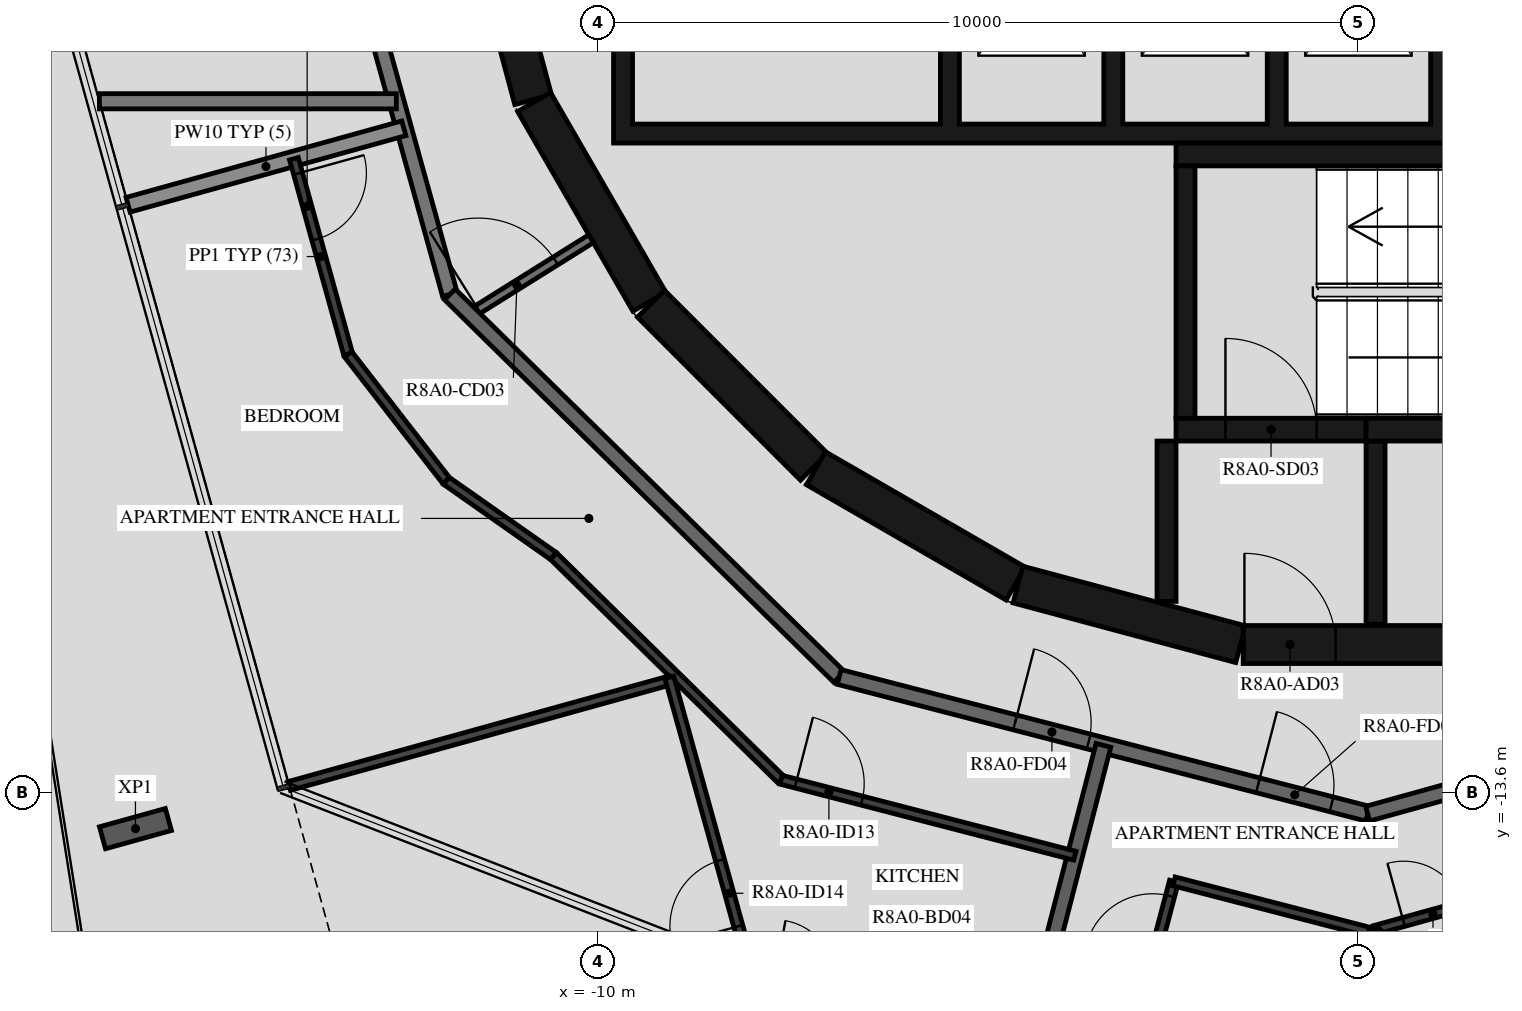
"""IFC4 building model, lengths in metres.
Left out: names, types, materials, properties, quantities, classifications, styles, units other than length and angle.
Written with IfcOpenShell. Run it as: python <this file> out.ifc"""

import sys

from ifc_helpers import new_model, si_unit, direction, frame, frame_2d, origin, origin_2d, place, context, subcontext, project, spatial, polyline, rectangle, i_section, outline, extrude, element, fill, save


model = new_model("IFC4")
c1 = context("Model", 3, precision=1e-05, world=origin(), true_north=direction((0.0, 1.0)))
c2 = subcontext(c1, "Body", "Model", "MODEL_VIEW")
j1 = project(units=[si_unit("LENGTHUNIT", "METRE"), si_unit("PLANEANGLEUNIT", "RADIAN")], contexts=[c1])
p1 = place(None, origin())
s1 = spatial("IfcSite", under=j1, at=p1, CompositionType="ELEMENT")
p2 = place(p1, origin())
s2 = spatial("IfcBuilding", under=s1, at=p2, CompositionType="ELEMENT")
p3 = place(p2, frame((0.0, 0.0, 298.2)))
s3 = spatial("IfcBuildingStorey", under=s2, at=p3, CompositionType="ELEMENT", Elevation=298.2)
p4 = place(p3, frame((-16.09, -14.069, -0.45), z_axis=(0.0, 0.0, 1.0), x_axis=(-0.267238143562, 0.963630517691, 0.0)))
e1 = element("IfcColumn", 1, at=p4, inside=s3, PredefinedType="COLUMN", context=c2, shape_type="SweptSolid", body=[
    extrude(i_section(OverallWidth=0.3, OverallDepth=0.9, WebThickness=0.019, FlangeThickness=0.035, FilletRadius=0.03, at=origin_2d()), origin(), (0.0, 0.0, 1.0), 3.57),
])
p5 = place(p3, frame((-11.643, -1.55, 0.0), z_axis=(0.0, 0.0, 1.0), x_axis=(0.258734743916, -0.965948410781, 0.0)))
e2 = element("IfcWall", 2, at=p5, inside=s3, PredefinedType="SHEAR", context=c2, shape_type="SweptSolid", body=[
    extrude(rectangle(XDim=3.033, YDim=0.5, at=frame_2d((1.516, 0.0))), origin(), (0.0, 0.0, 1.0), 3.12),
])
p6 = place(p5, frame((1.066, 0.0, 0.0)))
e3 = element("IfcOpeningElement", 3, at=p6, cuts=e2, PredefinedType="OPENING", context=c2, shape_type="SweptSolid", body=[
    extrude(rectangle(XDim=0.9, YDim=2.1, at=frame_2d((0.45, 1.05))), frame((0.0, 0.26, 0.0), z_axis=(0.0, -1.0, 0.0), x_axis=(1.0, 0.0, 0.0)), (0.0, 0.0, 1.0), 0.52),
])
p7 = place(p3, frame((-10.845, -4.51, 0.0), z_axis=(0.0, 0.0, 1.0), x_axis=(0.500087131594, -0.865975092491, 0.0)))
e4 = element("IfcWall", 4, at=p7, inside=s3, PredefinedType="SHEAR", context=c2, shape_type="SweptSolid", body=[
    extrude(rectangle(XDim=3.033, YDim=0.5, at=frame_2d((1.516, 0.0))), origin(), (0.0, 0.0, 1.0), 3.12),
])
p8 = place(p3, frame((-9.308, -7.164, 0.0), z_axis=(0.0, 0.0, 1.0), x_axis=(0.707106781187, -0.707106781187, 0.0)))
e5 = element("IfcWall", 5, at=p8, inside=s3, PredefinedType="SHEAR", context=c2, shape_type="SweptSolid", body=[
    extrude(rectangle(XDim=3.032, YDim=0.5, at=frame_2d((1.516, 0.0))), origin(), (0.0, 0.0, 1.0), 3.12),
])
for number, where, z_axis, x_axis in (
    (6, (-7.137, -9.329, 0.0), (0.0, 0.0, 1.0), (0.866, -0.5, 0.0)),
    (7, (-4.479, -10.858, 0.0), (0.0, 0.0, 1.0), (0.966, -0.259, 0.0)),
):
    element("IfcWall", number, at=place(p3, frame(where, z_axis=z_axis, x_axis=x_axis)), inside=s3, PredefinedType="SHEAR", context=c2, shape_type="SweptSolid", body=[
        extrude(rectangle(XDim=3.033, YDim=0.5, at=frame_2d((1.516, 0.0))), origin(), (0.0, 0.0, 1.0), 3.12),
    ])
p9 = place(p3, frame((-1.516, -11.647, 0.0), z_axis=(0.0, 0.0, 1.0), x_axis=(1.0, 0.0, 0.0)))
e8 = element("IfcWall", 8, at=p9, inside=s3, PredefinedType="SHEAR", context=c2, shape_type="SweptSolid", body=[
    extrude(rectangle(XDim=3.033, YDim=0.5, at=frame_2d((1.516, 0.0))), origin(), (0.0, 0.0, 1.0), 3.12),
])
p10 = place(p9, frame((0.016, 0.0, 0.0)))
e9 = element("IfcOpeningElement", 9, at=p10, cuts=e8, PredefinedType="OPENING", context=c2, shape_type="SweptSolid", body=[
    extrude(rectangle(XDim=1.2, YDim=2.1, at=frame_2d((0.6, 1.05))), frame((0.0, 0.26, 0.0), z_axis=(0.0, -1.0, 0.0), x_axis=(1.0, 0.0, 0.0)), (0.0, 0.0, 1.0), 0.52),
])
p11 = place(p3, frame((-2.275, -8.67, 0.0), z_axis=(0.0, 0.0, 1.0), x_axis=(0.0, 1.0, 0.0)))
e10 = element("IfcWall", 10, at=p11, inside=s3, PredefinedType="SHEAR", context=c2, shape_type="SweptSolid", body=[
    extrude(rectangle(XDim=3.32, YDim=0.25, at=frame_2d((1.66, 0.0))), origin(), (0.0, 0.0, 1.0), 3.12),
])
p12 = place(p3, frame((-2.4, -5.2, 0.0), z_axis=(0.0, 0.0, 1.0), x_axis=(1.0, 0.0, 0.0)))
e11 = element("IfcWall", 11, at=p12, inside=s3, PredefinedType="SHEAR", context=c2, shape_type="SweptSolid", body=[
    extrude(rectangle(XDim=7.05, YDim=0.3, at=frame_2d((3.525, 0.0))), origin(), (0.0, 0.0, 1.0), 3.12),
])
p13 = place(p3, frame((0.1, -8.82, 0.0), z_axis=(0.0, 0.0, 1.0), x_axis=(1.0, 0.0, 0.0)))
e12 = element("IfcWall", 12, at=p13, inside=s3, PredefinedType="SHEAR", context=c2, shape_type="SweptSolid", body=[
    extrude(rectangle(XDim=4.55, YDim=0.3, at=frame_2d((2.275, 0.0))), origin(), (0.0, 0.0, 1.0), 3.12),
])
p14 = place(p3, frame((-2.4, -8.82, 0.0), z_axis=(0.0, 0.0, 1.0), x_axis=(1.0, 0.0, 0.0)))
e13 = element("IfcWall", 13, at=p14, inside=s3, PredefinedType="SHEAR", context=c2, shape_type="SweptSolid", body=[
    extrude(rectangle(XDim=2.5, YDim=0.3, at=frame_2d((1.25, 0.0))), origin(), (0.0, 0.0, 1.0), 3.12),
])
p15 = place(p14, frame((0.65, 0.0, 0.0)))
e14 = element("IfcOpeningElement", 14, at=p15, cuts=e13, PredefinedType="OPENING", context=c2, shape_type="SweptSolid", body=[
    extrude(rectangle(XDim=1.2, YDim=2.1, at=frame_2d((0.6, 1.05))), frame((0.0, 0.16, 0.0), z_axis=(0.0, -1.0, 0.0), x_axis=(1.0, 0.0, 0.0)), (0.0, 0.0, 1.0), 0.32),
])
p16 = place(p3, frame((-2.525, -8.97, 0.0), z_axis=(0.0, 0.0, 1.0), x_axis=(0.0, -1.0, 0.0)))
e15 = element("IfcWall", 15, at=p16, inside=s3, PredefinedType="SHEAR", context=c2, shape_type="SweptSolid", body=[
    extrude(rectangle(XDim=2.11, YDim=0.25, at=frame_2d((1.055, 0.0))), origin(), (0.0, 0.0, 1.0), 3.12),
])
p17 = place(p3, frame((0.225, -8.97, 0.0), z_axis=(0.0, 0.0, 1.0), x_axis=(0.0, -1.0, 0.0)))
e16 = element("IfcWall", 16, at=p17, inside=s3, PredefinedType="SHEAR", context=c2, shape_type="SweptSolid", body=[
    extrude(rectangle(XDim=2.41, YDim=0.25, at=frame_2d((1.205, 0.0))), origin(), (0.0, 0.0, 1.0), 3.12),
])
p18 = place(p3, origin())
e17 = element("IfcWall", 17, at=p18, inside=s3, PredefinedType="SHEAR", context=c2, shape_type="SweptSolid", body=[
    extrude(outline(polyline([(9.8, -5.05), (9.8, -4.8), (9.8, -1.9), (9.55, -1.9), (9.55, -4.8), (7.65, -4.8), (7.65, -1.9), (7.4, -1.9), (7.4, -4.8), (5.5, -4.8), (5.5, -1.9), (5.25, -1.9), (5.25, -4.8), (3.35, -4.8), (3.35, -1.9), (3.1, -1.9), (3.1, -4.8), (1.2, -4.8), (1.2, -1.9), (0.95, -1.9), (0.95, -4.8), (-0.95, -4.8), (-0.95, -1.9), (-1.2, -1.9), (-1.2, -4.8), (-3.1, -4.8), (-3.1, -1.9), (-3.35, -1.9), (-3.35, -4.8), (-5.25, -4.8), (-5.25, -1.9), (-5.5, -1.9), (-5.5, -4.8), (-9.55, -4.8), (-9.55, -1.9), (-9.8, -1.9), (-9.8, -4.8), (-9.8, -5.05), (9.8, -5.05)])), origin(), (0.0, 0.0, 1.0), 3.12),
])
p19 = place(p3, frame((-11.687, -7.303, 0.0), z_axis=(0.0, 0.0, 1.0), x_axis=(0.848064094072, 0.529893661357, 0.0)))
e18 = element("IfcWall", 18, at=p19, inside=s3, PredefinedType="PARTITIONING", context=c2, shape_type="SweptSolid", body=[
    extrude(rectangle(XDim=1.876, YDim=0.12, at=frame_2d((0.938, 0.0))), origin(), (0.0, 0.0, 1.0), 3.12),
])
p20 = place(p19, frame((0.125, 0.0, 0.0)))
e19 = element("IfcOpeningElement", 19, at=p20, cuts=e18, PredefinedType="OPENING", context=c2, shape_type="SweptSolid", body=[
    extrude(rectangle(XDim=1.2, YDim=2.1, at=frame_2d((0.6, 1.05))), frame((0.0, 0.07, 0.0), z_axis=(0.0, -1.0, 0.0), x_axis=(1.0, 0.0, 0.0)), (0.0, 0.0, 1.0), 0.14),
])
p21 = place(p3, frame((-13.872, -0.121, 0.0), z_axis=(0.0, 0.0, 1.0), x_axis=(0.267254575108, -0.963625960674, 0.0)))
e20 = element("IfcWall", 20, at=p21, inside=s3, PredefinedType="STANDARD", context=c2, shape_type="SweptSolid", body=[
    extrude(rectangle(XDim=7.181, YDim=0.2, at=frame_2d((3.591, 0.0))), origin(), (0.0, 0.0, 1.0), 3.12),
])
p22 = place(p3, frame((-11.953, -7.041, 0.0), z_axis=(0.0, 0.0, 1.0), x_axis=(0.713250549143, -0.70090916255, 0.0)))
e21 = element("IfcWall", 21, at=p22, inside=s3, PredefinedType="STANDARD", context=c2, shape_type="SweptSolid", body=[
    extrude(rectangle(XDim=7.181, YDim=0.2, at=frame_2d((3.59, 0.0))), origin(), (0.0, 0.0, 1.0), 3.12),
])
p23 = place(p3, frame((-6.831, -12.074, 0.0), z_axis=(0.0, 0.0, 1.0), x_axis=(0.968144780225, -0.250391063186, 0.0)))
e22 = element("IfcWall", 22, at=p23, inside=s3, PredefinedType="STANDARD", context=c2, shape_type="SweptSolid", body=[
    extrude(rectangle(XDim=7.181, YDim=0.2, at=frame_2d((3.591, 0.0))), origin(), (0.0, 0.0, 1.0), 3.12),
])
p24 = place(p23, frame((2.39, 0.0, 0.0)))
e23 = element("IfcOpeningElement", 23, at=p24, cuts=e22, PredefinedType="OPENING", context=c2, shape_type="SweptSolid", body=[
    extrude(rectangle(XDim=1.0, YDim=2.1, at=frame_2d((0.5, 1.05))), frame((0.0, 0.11, 0.0), z_axis=(0.0, -1.0, 0.0), x_axis=(1.0, 0.0, 0.0)), (0.0, 0.0, 1.0), 0.22),
])
p25 = place(p23, frame((5.69, 0.0, 0.0)))
e24 = element("IfcOpeningElement", 24, at=p25, cuts=e22, PredefinedType="OPENING", context=c2, shape_type="SweptSolid", body=[
    extrude(rectangle(XDim=1.0, YDim=2.1, at=frame_2d((0.5, 1.05))), frame((0.0, 0.11, 0.0), z_axis=(0.0, -1.0, 0.0), x_axis=(1.0, 0.0, 0.0)), (0.0, 0.0, 1.0), 0.22),
])
p26 = place(p3, frame((0.121, -13.872, 0.0), z_axis=(0.0, 0.0, 1.0), x_axis=(0.963625960674, 0.267254575108, 0.0)))
e25 = element("IfcWall", 25, at=p26, inside=s3, PredefinedType="STANDARD", context=c2, shape_type="SweptSolid", body=[
    extrude(rectangle(XDim=7.181, YDim=0.2, at=frame_2d((3.591, 0.0))), origin(), (0.0, 0.0, 1.0), 3.12),
])
p27 = place(p3, frame((-16.564, -4.5, 0.0), z_axis=(0.0, 0.0, 1.0), x_axis=(1.0, 0.0, 0.0)))
e26 = element("IfcWall", 26, at=p27, inside=s3, PredefinedType="STANDARD", context=c2, shape_type="SweptSolid", body=[
    extrude(rectangle(XDim=3.907, YDim=0.2, at=frame_2d((1.953, 0.0))), origin(), (0.0, 0.0, 1.0), 3.12),
])
p28 = place(p3, frame((-16.187, -5.862, 0.0), z_axis=(0.0, 0.0, 1.0), x_axis=(0.963631166683, 0.267235803358, 0.0)))
e27 = element("IfcWall", 27, at=p28, inside=s3, PredefinedType="STANDARD", context=c2, shape_type="SweptSolid", body=[
    extrude(rectangle(XDim=3.765, YDim=0.2, at=frame_2d((1.882, 0.0))), origin(), (0.0, 0.0, 1.0), 2.73),
])
p29 = place(p3, frame((-4.214, -16.295, 0.0), z_axis=(0.0, 0.0, 1.0), x_axis=(0.250428810918, 0.968135016752, 0.0)))
e28 = element("IfcWall", 28, at=p29, inside=s3, PredefinedType="STANDARD", context=c2, shape_type="SweptSolid", body=[
    extrude(rectangle(XDim=3.432, YDim=0.2, at=frame_2d((1.716, 0.0))), origin(), (0.0, 0.0, 1.0), 3.12),
])
p30 = place(p3, frame((-14.005, -5.256, 0.0), z_axis=(0.0, 0.0, 1.0), x_axis=(0.267200500487, -0.963640956238, 0.0)))
e29 = element("IfcWall", 29, at=p30, inside=s3, PredefinedType="PARTITIONING", context=c2, shape_type="SweptSolid", body=[
    extrude(rectangle(XDim=2.67, YDim=0.12, at=frame_2d((1.335, 0.0))), origin(), (0.0, 0.0, 1.0), 3.12),
])
p31 = place(p30, frame((0.2, 0.0, 0.0)))
e30 = element("IfcOpeningElement", 30, at=p31, cuts=e29, PredefinedType="OPENING", context=c2, shape_type="SweptSolid", body=[
    extrude(rectangle(XDim=0.9, YDim=2.1, at=frame_2d((0.45, 1.05))), frame((0.0, 0.07, 0.0), z_axis=(0.0, -1.0, 0.0), x_axis=(1.0, 0.0, 0.0)), (0.0, 0.0, 1.0), 0.14),
])
p32 = place(p3, frame((-13.291, -7.829, 0.0), z_axis=(0.0, 0.0, 1.0), x_axis=(0.613017069232, -0.790069663277, 0.0)))
e31 = element("IfcWall", 31, at=p32, inside=s3, PredefinedType="PARTITIONING", context=c2, shape_type="SweptSolid", body=[
    extrude(rectangle(XDim=2.106, YDim=0.12, at=frame_2d((1.053, 0.0))), origin(), (0.0, 0.0, 1.0), 3.12),
])
p33 = place(p3, frame((-12.0, -9.493, 0.0), z_axis=(0.0, 0.0, 1.0), x_axis=(0.818312362022, -0.57477376259, 0.0)))
e32 = element("IfcWall", 32, at=p33, inside=s3, PredefinedType="PARTITIONING", context=c2, shape_type="SweptSolid", body=[
    extrude(rectangle(XDim=1.723, YDim=0.12, at=frame_2d((0.862, 0.0))), origin(), (0.0, 0.0, 1.0), 3.12),
])
p34 = place(p3, frame((-10.59, -10.483, 0.0), z_axis=(0.0, 0.0, 1.0), x_axis=(0.713244109461, -0.70091571556, 0.0)))
e33 = element("IfcWall", 33, at=p34, inside=s3, PredefinedType="PARTITIONING", context=c2, shape_type="SweptSolid", body=[
    extrude(rectangle(XDim=4.198, YDim=0.12, at=frame_2d((2.099, 0.0))), origin(), (0.0, 0.0, 1.0), 3.12),
])
p35 = place(p3, frame((-7.596, -13.426, 0.0), z_axis=(0.0, 0.0, 1.0), x_axis=(0.96815406745, -0.250355151095, 0.0)))
e34 = element("IfcWall", 34, at=p35, inside=s3, PredefinedType="PARTITIONING", context=c2, shape_type="SweptSolid", body=[
    extrude(rectangle(XDim=3.992, YDim=0.12, at=frame_2d((1.996, 0.0))), origin(), (0.0, 0.0, 1.0), 3.12),
])
p36 = place(p35, frame((0.2, 0.0, 0.0)))
e35 = element("IfcOpeningElement", 35, at=p36, cuts=e34, PredefinedType="OPENING", context=c2, shape_type="SweptSolid", body=[
    extrude(rectangle(XDim=0.9, YDim=2.1, at=frame_2d((0.45, 1.05))), frame((0.0, 0.07, 0.0), z_axis=(0.0, -1.0, 0.0), x_axis=(1.0, 0.0, 0.0)), (0.0, 0.0, 1.0), 0.14),
])
p37 = place(p3, frame((-14.066, -13.508, 0.0), z_axis=(0.0, 0.0, 1.0), x_axis=(0.963643585504, 0.267191018032, 0.0)))
e36 = element("IfcWall", 36, at=p37, inside=s3, PredefinedType="PARTITIONING", context=c2, shape_type="SweptSolid", body=[
    extrude(rectangle(XDim=5.2, YDim=0.12, at=frame_2d((2.6, 0.0))), origin(), (0.0, 0.0, 1.0), 2.73),
])
p38 = place(p3, frame((-7.368, -18.202, 0.0), z_axis=(0.0, 0.0, 1.0), x_axis=(-0.26723158658, 0.963632336077, 0.0)))
e37 = element("IfcWall", 37, at=p38, inside=s3, PredefinedType="PARTITIONING", context=c2, shape_type="SweptSolid", body=[
    extrude(rectangle(XDim=6.353, YDim=0.12, at=frame_2d((3.177, 0.0))), origin(), (0.0, 0.0, 1.0), 3.12),
])
p39 = place(p38, frame((2.956, 0.0, 0.0)))
e38 = element("IfcOpeningElement", 38, at=p39, cuts=e37, PredefinedType="OPENING", context=c2, shape_type="SweptSolid", body=[
    extrude(rectangle(XDim=0.9, YDim=2.1, at=frame_2d((0.45, 1.05))), frame((0.0, 0.07, 0.0), z_axis=(0.0, -1.0, 0.0), x_axis=(1.0, 0.0, 0.0)), (0.0, 0.0, 1.0), 0.14),
])
p40 = place(p3, frame((-3.139, -17.448, 0.0), z_axis=(0.0, 0.0, 1.0), x_axis=(0.256551998295, 0.966530430028, 0.0)))
e39 = element("IfcWall", 39, at=p40, inside=s3, PredefinedType="PARTITIONING", context=c2, shape_type="SweptSolid", body=[
    extrude(rectangle(XDim=2.778, YDim=0.12, at=frame_2d((1.389, 0.0))), origin(), (0.0, 0.0, 1.0), 3.12),
])
p41 = place(p40, frame((1.678, 0.0, 0.0)))
e40 = element("IfcOpeningElement", 40, at=p41, cuts=e39, PredefinedType="OPENING", context=c2, shape_type="SweptSolid", body=[
    extrude(rectangle(XDim=0.9, YDim=2.1, at=frame_2d((0.45, 1.05))), frame((0.0, 0.07, 0.0), z_axis=(0.0, -1.0, 0.0), x_axis=(1.0, 0.0, 0.0)), (0.0, 0.0, 1.0), 0.14),
])
p42 = place(p3, frame((-2.427, -14.763, 0.0), z_axis=(0.0, 0.0, 1.0), x_axis=(0.968151154118, -0.250366417036, 0.0)))
e41 = element("IfcWall", 41, at=p42, inside=s3, PredefinedType="PARTITIONING", context=c2, shape_type="SweptSolid", body=[
    extrude(rectangle(XDim=2.646, YDim=0.12, at=frame_2d((1.323, 0.0))), origin(), (0.0, 0.0, 1.0), 3.12),
])
p43 = place(p3, frame((0.21, -15.404, 0.0), z_axis=(0.0, 0.0, 1.0), x_axis=(0.963630625717, 0.267237754032, 0.0)))
e42 = element("IfcWall", 42, at=p43, inside=s3, PredefinedType="PARTITIONING", context=c2, shape_type="SweptSolid", body=[
    extrude(rectangle(XDim=7.907, YDim=0.12, at=frame_2d((3.954, 0.0))), origin(), (0.0, 0.0, 1.0), 3.12),
])
p44 = place(p43, frame((0.4, 0.0, 0.0)))
e43 = element("IfcOpeningElement", 43, at=p44, cuts=e42, PredefinedType="OPENING", context=c2, shape_type="SweptSolid", body=[
    extrude(rectangle(XDim=0.8, YDim=2.1, at=frame_2d((0.4, 1.05))), frame((0.0, 0.07, 0.0), z_axis=(0.0, -1.0, 0.0), x_axis=(1.0, 0.0, 0.0)), (0.0, 0.0, 1.0), 0.14),
])
p45 = place(p43, frame((5.436, 0.0, 0.0)))
e44 = element("IfcOpeningElement", 44, at=p45, cuts=e42, PredefinedType="OPENING", context=c2, shape_type="SweptSolid", body=[
    extrude(rectangle(XDim=0.9, YDim=2.1, at=frame_2d((0.45, 1.05))), frame((0.0, 0.07, 0.0), z_axis=(0.0, -1.0, 0.0), x_axis=(1.0, 0.0, 0.0)), (0.0, 0.0, 1.0), 0.14),
])
p46 = place(p3, frame((-1.304, -20.68, 0.0), z_axis=(0.0, 0.0, 1.0), x_axis=(0.700896976526, 0.713262524108, 0.0)))
e45 = element("IfcWall", 45, at=p46, inside=s3, PredefinedType="PARTITIONING", context=c2, shape_type="SweptSolid", body=[
    extrude(rectangle(XDim=9.358, YDim=0.12, at=frame_2d((4.679, 0.0))), origin(), (0.0, 0.0, 1.0), 3.12),
])
p47 = place(p46, frame((0.849, 0.0, 0.0)))
e46 = element("IfcOpeningElement", 46, at=p47, cuts=e45, PredefinedType="OPENING", context=c2, shape_type="SweptSolid", body=[
    extrude(rectangle(XDim=0.9, YDim=2.1, at=frame_2d((0.45, 1.05))), frame((0.0, 0.07, 0.0), z_axis=(0.0, -1.0, 0.0), x_axis=(1.0, 0.0, 0.0)), (0.0, 0.0, 1.0), 0.14),
])
p48 = place(p3, frame((2.077, -17.239, 0.0), z_axis=(0.0, 0.0, 1.0), x_axis=(-0.713235001716, 0.700924983381, 0.0)))
e47 = element("IfcWall", 47, at=p48, inside=s3, PredefinedType="PARTITIONING", context=c2, shape_type="SweptSolid", body=[
    extrude(rectangle(XDim=2.618, YDim=0.12, at=frame_2d((1.309, 0.0))), origin(), (0.0, 0.0, 1.0), 3.12),
])
p49 = place(p15, origin())
e48 = element("IfcDoor", 48, at=p49, inside=s3, OperationType="SINGLE_SWING_LEFT", PredefinedType="DOOR", context=c2, shape_type="SweptSolid", body=[
    extrude(rectangle(XDim=1.2, YDim=2.1, at=frame_2d((0.6, 1.05))), frame((0.0, 0.025, 0.0), z_axis=(0.0, -1.0, 0.0), x_axis=(1.0, 0.0, 0.0)), (0.0, 0.0, 1.0), 0.05),
])
fill(e14, e48)
p50 = place(p10, origin())
e49 = element("IfcDoor", 49, at=p50, inside=s3, OperationType="SINGLE_SWING_RIGHT", PredefinedType="DOOR", context=c2, shape_type="SweptSolid", body=[
    extrude(rectangle(XDim=1.2, YDim=2.1, at=frame_2d((0.6, 1.05))), frame((0.0, 0.025, 0.0), z_axis=(0.0, -1.0, 0.0), x_axis=(1.0, 0.0, 0.0)), (0.0, 0.0, 1.0), 0.05),
])
fill(e9, e49)
p51 = place(p24, origin())
e50 = element("IfcDoor", 50, at=p51, inside=s3, OperationType="SINGLE_SWING_RIGHT", PredefinedType="DOOR", context=c2, shape_type="SweptSolid", body=[
    extrude(rectangle(XDim=1.0, YDim=2.1, at=frame_2d((0.5, 1.05))), frame((0.0, 0.025, 0.0), z_axis=(0.0, -1.0, 0.0), x_axis=(1.0, 0.0, 0.0)), (0.0, 0.0, 1.0), 0.05),
])
fill(e23, e50)
p52 = place(p31, origin())
e51 = element("IfcDoor", 51, at=p52, inside=s3, OperationType="SINGLE_SWING_RIGHT", PredefinedType="DOOR", context=c2, shape_type="SweptSolid", body=[
    extrude(rectangle(XDim=0.9, YDim=2.1, at=frame_2d((0.45, 1.05))), frame((0.0, 0.025, 0.0), z_axis=(0.0, -1.0, 0.0), x_axis=(1.0, 0.0, 0.0)), (0.0, 0.0, 1.0), 0.05),
])
fill(e30, e51)
p53 = place(p36, origin())
e52 = element("IfcDoor", 52, at=p53, inside=s3, OperationType="SINGLE_SWING_RIGHT", PredefinedType="DOOR", context=c2, shape_type="SweptSolid", body=[
    extrude(rectangle(XDim=0.9, YDim=2.1, at=frame_2d((0.45, 1.05))), frame((0.0, 0.025, 0.0), z_axis=(0.0, -1.0, 0.0), x_axis=(1.0, 0.0, 0.0)), (0.0, 0.0, 1.0), 0.05),
])
fill(e35, e52)
p54 = place(p39, origin())
e53 = element("IfcDoor", 53, at=p54, inside=s3, OperationType="SINGLE_SWING_RIGHT", PredefinedType="DOOR", context=c2, shape_type="SweptSolid", body=[
    extrude(rectangle(XDim=0.9, YDim=2.1, at=frame_2d((0.45, 1.05))), frame((0.0, 0.025, 0.0), z_axis=(0.0, -1.0, 0.0), x_axis=(1.0, 0.0, 0.0)), (0.0, 0.0, 1.0), 0.05),
])
fill(e38, e53)
p55 = place(p25, origin())
e54 = element("IfcDoor", 54, at=p55, inside=s3, OperationType="SINGLE_SWING_LEFT", PredefinedType="DOOR", context=c2, shape_type="SweptSolid", body=[
    extrude(rectangle(XDim=1.0, YDim=2.1, at=frame_2d((0.5, 1.05))), frame((0.0, 0.025, 0.0), z_axis=(0.0, -1.0, 0.0), x_axis=(1.0, 0.0, 0.0)), (0.0, 0.0, 1.0), 0.05),
])
fill(e24, e54)
p56 = place(p41, origin())
e55 = element("IfcDoor", 55, at=p56, inside=s3, OperationType="SINGLE_SWING_LEFT", PredefinedType="DOOR", context=c2, shape_type="SweptSolid", body=[
    extrude(rectangle(XDim=0.9, YDim=2.1, at=frame_2d((0.45, 1.05))), frame((0.0, 0.025, 0.0), z_axis=(0.0, -1.0, 0.0), x_axis=(1.0, 0.0, 0.0)), (0.0, 0.0, 1.0), 0.05),
])
fill(e40, e55)
p57 = place(p44, origin())
e56 = element("IfcDoor", 56, at=p57, inside=s3, OperationType="SINGLE_SWING_LEFT", PredefinedType="DOOR", context=c2, shape_type="SweptSolid", body=[
    extrude(rectangle(XDim=0.8, YDim=2.1, at=frame_2d((0.4, 1.05))), frame((0.0, 0.025, 0.0), z_axis=(0.0, -1.0, 0.0), x_axis=(1.0, 0.0, 0.0)), (0.0, 0.0, 1.0), 0.05),
])
fill(e43, e56)
p58 = place(p20, origin())
e57 = element("IfcDoor", 57, at=p58, inside=s3, OperationType="DOUBLE_DOOR_SINGLE_SWING", PredefinedType="DOOR", context=c2, shape_type="SweptSolid", body=[
    extrude(rectangle(XDim=1.2, YDim=2.1, at=frame_2d((0.6, 1.05))), frame((0.0, 0.025, 0.0), z_axis=(0.0, -1.0, 0.0), x_axis=(1.0, 0.0, 0.0)), (0.0, 0.0, 1.0), 0.05),
])
fill(e19, e57)
save(model, sys.argv[1])
